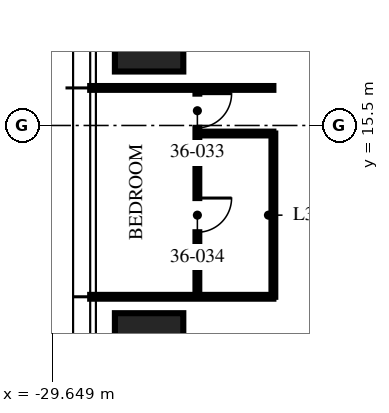
"""IFC4 building model, lengths in metres.
Left out: names, types, materials, properties, quantities, classifications, styles, units other than length and angle.
Written with IfcOpenShell. Run it as: python <this file> out.ifc"""

import sys

from ifc_helpers import new_model, si_unit, direction, frame, frame_2d, origin, origin_2d, place, context, subcontext, project, spatial, rectangle, extrude, element, fill, save


model = new_model("IFC4")
c1 = context("Model", 3, precision=1e-05, world=origin(), true_north=direction((0.0, 1.0)))
c2 = subcontext(c1, "Body", "Model", "MODEL_VIEW")
j1 = project(units=[si_unit("LENGTHUNIT", "METRE"), si_unit("PLANEANGLEUNIT", "RADIAN")], contexts=[c1])
p1 = place(None, origin())
s1 = spatial("IfcSite", under=j1, at=p1, CompositionType="ELEMENT")
p2 = place(p1, origin())
s2 = spatial("IfcBuilding", under=s1, at=p2, CompositionType="ELEMENT")
p3 = place(p2, frame((0.0, 0.0, 144.75)))
s3 = spatial("IfcBuildingStorey", under=s2, at=p3, CompositionType="ELEMENT", Elevation=144.75)
for number, where, z_axis, x_axis in (
    (1, (-27.1, 9.16, 0.0), (0.0, 0.0, 1.0), (0.0, 1.0, 0.0)),
    (2, (-27.1, 18.32, 0.0), (0.0, 0.0, 1.0), (0.0, 1.0, 0.0)),
):
    element("IfcColumn", number, at=place(p3, frame(where, z_axis=z_axis, x_axis=x_axis)), inside=s3, PredefinedType="COLUMN", context=c2, shape_type="SweptSolid", body=[
        extrude(rectangle(XDim=2.8, YDim=1.8, at=origin_2d()), origin(), (0.0, 0.0, 1.0), 3.75),
    ])
for number, where, z_axis, x_axis in (
    (3, (-23.83, 16.488, 0.0), (0.0, 0.0, 1.0), (-1.0, 0.0, 0.0)),
    (4, (-23.83, 10.992, 0.0), (0.0, 0.0, 1.0), (-1.0, 0.0, 0.0)),
):
    element("IfcWall", number, at=place(p3, frame(where, z_axis=z_axis, x_axis=x_axis)), inside=s3, PredefinedType="PARTITIONING", context=c2, shape_type="SweptSolid", body=[
        extrude(rectangle(XDim=4.82, YDim=0.1, at=frame_2d((2.41, 0.0))), origin(), (0.0, 0.0, 1.0), 2.81),
    ])
p4 = place(p3, frame((-25.83, 16.488, 0.0), z_axis=(0.0, 0.0, 1.0), x_axis=(0.0, -1.0, 0.0)))
e5 = element("IfcWall", 5, at=p4, inside=s3, PredefinedType="PARTITIONING", context=c2, shape_type="SweptSolid", body=[
    extrude(rectangle(XDim=5.496, YDim=0.1, at=frame_2d((2.748, 0.0))), origin(), (0.0, 0.0, 1.0), 2.81),
])
p5 = place(p4, frame((0.15, 0.0, 0.0)))
e6 = element("IfcOpeningElement", 6, at=p5, cuts=e5, PredefinedType="OPENING", context=c2, shape_type="SweptSolid", body=[
    extrude(rectangle(XDim=0.9, YDim=2.1, at=frame_2d((0.45, 1.05))), frame((0.0, 0.06, 0.0), z_axis=(0.0, -1.0, 0.0), x_axis=(1.0, 0.0, 0.0)), (0.0, 0.0, 1.0), 0.12),
])
p6 = place(p4, frame((2.898, 0.0, 0.0)))
e7 = element("IfcOpeningElement", 7, at=p6, cuts=e5, PredefinedType="OPENING", context=c2, shape_type="SweptSolid", body=[
    extrude(rectangle(XDim=0.9, YDim=2.1, at=frame_2d((0.45, 1.05))), frame((0.0, 0.06, 0.0), z_axis=(0.0, -1.0, 0.0), x_axis=(1.0, 0.0, 0.0)), (0.0, 0.0, 1.0), 0.12),
])
p7 = place(p3, frame((-23.83, 15.288, 0.0), z_axis=(0.0, 0.0, 1.0), x_axis=(-1.0, 0.0, 0.0)))
e8 = element("IfcWall", 8, at=p7, inside=s3, PredefinedType="PARTITIONING", context=c2, shape_type="SweptSolid", body=[
    extrude(rectangle(XDim=2.0, YDim=0.1, at=frame_2d((1.0, 0.0))), origin(), (0.0, 0.0, 1.0), 3.5),
])
p8 = place(p3, frame((-23.83, 15.288, 0.0), z_axis=(0.0, 0.0, 1.0), x_axis=(0.0, -1.0, 0.0)))
e9 = element("IfcWall", 9, at=p8, inside=s3, PredefinedType="PARTITIONING", context=c2, shape_type="SweptSolid", body=[
    extrude(rectangle(XDim=4.296, YDim=0.1, at=frame_2d((2.148, 0.0))), origin(), (0.0, 0.0, 1.0), 2.81),
])
p9 = place(p5, origin())
e10 = element("IfcDoor", 10, at=p9, inside=s3, OperationType="SINGLE_SWING_LEFT", PredefinedType="DOOR", context=c2, shape_type="SweptSolid", body=[
    extrude(rectangle(XDim=0.9, YDim=2.1, at=frame_2d((0.45, 1.05))), frame((0.0, 0.025, 0.0), z_axis=(0.0, -1.0, 0.0), x_axis=(1.0, 0.0, 0.0)), (0.0, 0.0, 1.0), 0.05),
])
fill(e6, e10)
p10 = place(p6, origin())
e11 = element("IfcDoor", 11, at=p10, inside=s3, OperationType="SINGLE_SWING_LEFT", PredefinedType="DOOR", context=c2, shape_type="SweptSolid", body=[
    extrude(rectangle(XDim=0.9, YDim=2.1, at=frame_2d((0.45, 1.05))), frame((0.0, 0.025, 0.0), z_axis=(0.0, -1.0, 0.0), x_axis=(1.0, 0.0, 0.0)), (0.0, 0.0, 1.0), 0.05),
])
fill(e7, e11)
save(model, sys.argv[1])
